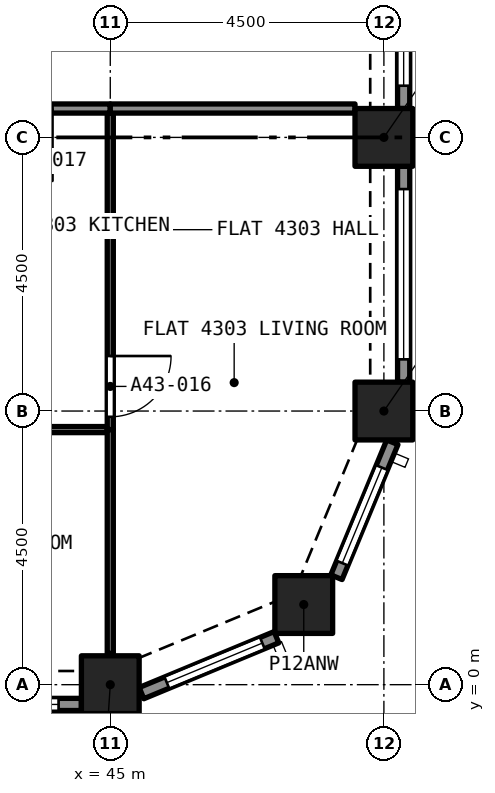
"""IFC4 building model, lengths in metres.
Left out: names, types, materials, properties, quantities, classifications, styles, units other than length and angle.
Written with IfcOpenShell. Run it as: python <this file> out.ifc"""

import sys

from ifc_helpers import new_model, si_unit, direction, frame, frame_2d, origin, origin_2d, place, context, subcontext, project, spatial, rectangle, extrude, element, fill, save


model = new_model("IFC4")
c1 = context("Model", 3, precision=1e-05, world=origin(), true_north=direction((0.0, 1.0)))
c2 = subcontext(c1, "Body", "Model", "MODEL_VIEW")
j1 = project(units=[si_unit("LENGTHUNIT", "METRE"), si_unit("PLANEANGLEUNIT", "RADIAN")], contexts=[c1])
p1 = place(None, origin())
s1 = spatial("IfcSite", under=j1, at=p1, CompositionType="ELEMENT")
p2 = place(p1, origin())
s2 = spatial("IfcBuilding", under=s1, at=p2, CompositionType="ELEMENT")
p3 = place(p2, frame((0.0, 0.0, 155.0)))
s3 = spatial("IfcBuildingStorey", under=s2, at=p3, CompositionType="ELEMENT", Elevation=155.0)
for number, where, z_axis, x_axis in (
    (1, (45.0, 0.0, 0.0), (0.0, 0.0, 1.0), (1.0, 0.0, 0.0)),
    (2, (48.182, 1.318, 0.0), (0.0, 0.0, 1.0), (1.0, 0.0, 0.0)),
    (3, (49.5, 4.5, 0.0), (0.0, 0.0, 1.0), (1.0, 0.0, 0.0)),
    (4, (49.5, 9.0, 0.0), (0.0, 0.0, 1.0), (1.0, 0.0, 0.0)),
):
    element("IfcColumn", number, at=place(p3, frame(where, z_axis=z_axis, x_axis=x_axis)), inside=s3, PredefinedType="COLUMN", context=c2, shape_type="SweptSolid", body=[
        extrude(rectangle(XDim=0.95, YDim=0.95, at=origin_2d()), origin(), (0.0, 0.0, 1.0), 4.4),
    ])
p4 = place(p3, frame((44.525, -0.325, 0.0), z_axis=(0.0, 0.0, 1.0), x_axis=(-1.0, 0.0, 0.0)))
e5 = element("IfcWall", 5, at=p4, inside=s3, PredefinedType="SOLIDWALL", context=c2, shape_type="SweptSolid", body=[
    extrude(rectangle(XDim=3.55, YDim=0.2, at=frame_2d((1.775, 0.0))), origin(), (0.0, 0.0, 1.0), 4.4),
])
p5 = place(p4, frame((0.375, 0.0, 0.45)))
e6 = element("IfcOpeningElement", 6, at=p5, cuts=e5, PredefinedType="OPENING", context=c2, shape_type="SweptSolid", body=[
    extrude(rectangle(XDim=2.8, YDim=2.55, at=frame_2d((1.4, 1.275))), frame((0.0, 0.11, 0.0), z_axis=(0.0, -1.0, 0.0), x_axis=(1.0, 0.0, 0.0)), (0.0, 0.0, 1.0), 0.22),
])
p6 = place(p3, frame((47.733, 0.78, 0.0), z_axis=(0.0, 0.0, 1.0), x_axis=(-0.923880599843, -0.382680855588, 0.0)))
e7 = element("IfcWall", 7, at=p6, inside=s3, PredefinedType="SOLIDWALL", context=c2, shape_type="SweptSolid", body=[
    extrude(rectangle(XDim=2.403, YDim=0.2, at=frame_2d((1.201, 0.0))), origin(), (0.0, 0.0, 1.0), 4.4),
])
p7 = place(p6, frame((0.251, 0.0, 0.45)))
e8 = element("IfcOpeningElement", 8, at=p7, cuts=e7, PredefinedType="OPENING", context=c2, shape_type="SweptSolid", body=[
    extrude(rectangle(XDim=1.7, YDim=2.55, at=frame_2d((0.85, 1.275))), frame((0.0, 0.11, 0.0), z_axis=(0.0, -1.0, 0.0), x_axis=(1.0, 0.0, 0.0)), (0.0, 0.0, 1.0), 0.22),
])
p8 = place(p3, frame((49.639, 3.987, 0.0), z_axis=(0.0, 0.0, 1.0), x_axis=(-0.382680855588, -0.923880599843, 0.0)))
e9 = element("IfcWall", 9, at=p8, inside=s3, PredefinedType="SOLIDWALL", context=c2, shape_type="SweptSolid", body=[
    extrude(rectangle(XDim=2.403, YDim=0.2, at=frame_2d((1.201, 0.0))), origin(), (0.0, 0.0, 1.0), 4.4),
])
p9 = place(p8, frame((0.451, 0.0, 0.45)))
e10 = element("IfcOpeningElement", 10, at=p9, cuts=e9, PredefinedType="OPENING", context=c2, shape_type="SweptSolid", body=[
    extrude(rectangle(XDim=1.7, YDim=2.55, at=frame_2d((0.85, 1.275))), frame((0.0, 0.11, 0.0), z_axis=(0.0, -1.0, 0.0), x_axis=(1.0, 0.0, 0.0)), (0.0, 0.0, 1.0), 0.22),
])
p10 = place(p3, frame((49.825, 8.525, 0.0), z_axis=(0.0, 0.0, 1.0), x_axis=(0.0, -1.0, 0.0)))
e11 = element("IfcWall", 11, at=p10, inside=s3, PredefinedType="SOLIDWALL", context=c2, shape_type="SweptSolid", body=[
    extrude(rectangle(XDim=3.55, YDim=0.2, at=frame_2d((1.775, 0.0))), origin(), (0.0, 0.0, 1.0), 4.4),
])
p11 = place(p10, frame((0.375, 0.0, 0.45)))
e12 = element("IfcOpeningElement", 12, at=p11, cuts=e11, PredefinedType="OPENING", context=c2, shape_type="SweptSolid", body=[
    extrude(rectangle(XDim=2.8, YDim=2.55, at=frame_2d((1.4, 1.275))), frame((0.0, 0.11, 0.0), z_axis=(0.0, -1.0, 0.0), x_axis=(1.0, 0.0, 0.0)), (0.0, 0.0, 1.0), 0.22),
])
p12 = place(p3, frame((49.825, 13.025, 0.0), z_axis=(0.0, 0.0, 1.0), x_axis=(0.0, -1.0, 0.0)))
e13 = element("IfcWall", 13, at=p12, inside=s3, PredefinedType="SOLIDWALL", context=c2, shape_type="SweptSolid", body=[
    extrude(rectangle(XDim=3.55, YDim=0.2, at=frame_2d((1.775, 0.0))), origin(), (0.0, 0.0, 1.0), 4.4),
])
p13 = place(p12, frame((0.375, 0.0, 0.45)))
e14 = element("IfcOpeningElement", 14, at=p13, cuts=e13, PredefinedType="OPENING", context=c2, shape_type="SweptSolid", body=[
    extrude(rectangle(XDim=2.8, YDim=2.55, at=frame_2d((1.4, 1.275))), frame((0.0, 0.11, 0.0), z_axis=(0.0, -1.0, 0.0), x_axis=(1.0, 0.0, 0.0)), (0.0, 0.0, 1.0), 0.22),
])
p14 = place(p3, frame((44.95, 4.195, 0.0), z_axis=(0.0, 0.0, 1.0), x_axis=(-1.0, 0.0, 0.0)))
e15 = element("IfcWall", 15, at=p14, inside=s3, PredefinedType="PARTITIONING", context=c2, shape_type="SweptSolid", body=[
    extrude(rectangle(XDim=4.35, YDim=0.1, at=frame_2d((2.175, 0.0))), origin(), (0.0, 0.0, 1.0), 4.1),
])
p15 = place(p14, frame((1.75, 0.0, 0.0)))
e16 = element("IfcOpeningElement", 16, at=p15, cuts=e15, PredefinedType="OPENING", context=c2, shape_type="SweptSolid", body=[
    extrude(rectangle(XDim=0.9, YDim=2.1, at=frame_2d((0.45, 1.05))), frame((0.0, 0.06, 0.0), z_axis=(0.0, -1.0, 0.0), x_axis=(1.0, 0.0, 0.0)), (0.0, 0.0, 1.0), 0.12),
])
p16 = place(p3, frame((45.0, 0.514, 0.0), z_axis=(0.0, 0.0, 1.0), x_axis=(0.0, 1.0, 0.0)))
e17 = element("IfcWall", 17, at=p16, inside=s3, PredefinedType="PARTITIONING", context=c2, shape_type="SweptSolid", body=[
    extrude(rectangle(XDim=3.681, YDim=0.1, at=frame_2d((1.84, 0.0))), origin(), (0.0, 0.0, 1.0), 4.1),
])
p17 = place(p3, frame((45.0, 9.4, 0.0), z_axis=(0.0, 0.0, 1.0), x_axis=(0.0, -1.0, 0.0)))
e18 = element("IfcWall", 18, at=p17, inside=s3, PredefinedType="PARTITIONING", context=c2, shape_type="SweptSolid", body=[
    extrude(rectangle(XDim=5.205, YDim=0.1, at=frame_2d((2.603, 0.0))), origin(), (0.0, 0.0, 1.0), 4.1),
])
p18 = place(p17, frame((3.995, 0.0, 0.0)))
e19 = element("IfcOpeningElement", 19, at=p18, cuts=e18, PredefinedType="OPENING", context=c2, shape_type="SweptSolid", body=[
    extrude(rectangle(XDim=1.0, YDim=2.1, at=frame_2d((0.5, 1.05))), frame((0.0, 0.06, 0.0), z_axis=(0.0, -1.0, 0.0), x_axis=(1.0, 0.0, 0.0)), (0.0, 0.0, 1.0), 0.12),
])
p19 = place(p3, frame((45.0, 9.475, 0.0), z_axis=(0.0, 0.0, 1.0), x_axis=(-1.0, 0.0, 0.0)))
e20 = element("IfcWall", 20, at=p19, inside=s3, PredefinedType="PARTITIONING", context=c2, shape_type="SweptSolid", body=[
    extrude(rectangle(XDim=2.35, YDim=0.15, at=frame_2d((1.175, 0.0))), origin(), (0.0, 0.0, 1.0), 4.1),
])
p20 = place(p19, frame((0.95, 0.0, 0.0)))
e21 = element("IfcOpeningElement", 21, at=p20, cuts=e20, PredefinedType="OPENING", context=c2, shape_type="SweptSolid", body=[
    extrude(rectangle(XDim=1.2, YDim=2.4, at=frame_2d((0.6, 1.2))), frame((0.0, 0.085, 0.0), z_axis=(0.0, -1.0, 0.0), x_axis=(1.0, 0.0, 0.0)), (0.0, 0.0, 1.0), 0.17),
])
p21 = place(p3, frame((45.0, 9.475, 0.0), z_axis=(0.0, 0.0, 1.0), x_axis=(1.0, 0.0, 0.0)))
e22 = element("IfcWall", 22, at=p21, inside=s3, PredefinedType="PARTITIONING", context=c2, shape_type="SweptSolid", body=[
    extrude(rectangle(XDim=4.025, YDim=0.15, at=frame_2d((2.012, 0.0))), origin(), (0.0, 0.0, 1.0), 4.1),
])
p22 = place(p5, origin())
e23 = element("IfcWindow", 23, at=p22, inside=s3, PartitioningType="SINGLE_PANEL", PredefinedType="WINDOW", context=c2, shape_type="SweptSolid", body=[
    extrude(rectangle(XDim=2.8, YDim=2.55, at=frame_2d((1.4, 1.275))), frame((0.0, 0.03, 0.0), z_axis=(0.0, -1.0, 0.0), x_axis=(1.0, 0.0, 0.0)), (0.0, 0.0, 1.0), 0.06),
])
fill(e6, e23)
p23 = place(p7, origin())
e24 = element("IfcWindow", 24, at=p23, inside=s3, PartitioningType="SINGLE_PANEL", PredefinedType="WINDOW", context=c2, shape_type="SweptSolid", body=[
    extrude(rectangle(XDim=1.7, YDim=2.55, at=frame_2d((0.85, 1.275))), frame((0.0, 0.03, 0.0), z_axis=(0.0, -1.0, 0.0), x_axis=(1.0, 0.0, 0.0)), (0.0, 0.0, 1.0), 0.06),
])
fill(e8, e24)
p24 = place(p9, origin())
e25 = element("IfcWindow", 25, at=p24, inside=s3, PartitioningType="SINGLE_PANEL", PredefinedType="WINDOW", context=c2, shape_type="SweptSolid", body=[
    extrude(rectangle(XDim=1.7, YDim=2.55, at=frame_2d((0.85, 1.275))), frame((0.0, 0.03, 0.0), z_axis=(0.0, -1.0, 0.0), x_axis=(1.0, 0.0, 0.0)), (0.0, 0.0, 1.0), 0.06),
])
fill(e10, e25)
p25 = place(p11, origin())
e26 = element("IfcWindow", 26, at=p25, inside=s3, PartitioningType="SINGLE_PANEL", PredefinedType="WINDOW", context=c2, shape_type="SweptSolid", body=[
    extrude(rectangle(XDim=2.8, YDim=2.55, at=frame_2d((1.4, 1.275))), frame((0.0, 0.03, 0.0), z_axis=(0.0, -1.0, 0.0), x_axis=(1.0, 0.0, 0.0)), (0.0, 0.0, 1.0), 0.06),
])
fill(e12, e26)
p26 = place(p13, origin())
e27 = element("IfcWindow", 27, at=p26, inside=s3, PartitioningType="SINGLE_PANEL", PredefinedType="WINDOW", context=c2, shape_type="SweptSolid", body=[
    extrude(rectangle(XDim=2.8, YDim=2.55, at=frame_2d((1.4, 1.275))), frame((0.0, 0.03, 0.0), z_axis=(0.0, -1.0, 0.0), x_axis=(1.0, 0.0, 0.0)), (0.0, 0.0, 1.0), 0.06),
])
fill(e14, e27)
p27 = place(p18, origin())
e28 = element("IfcDoor", 28, at=p27, inside=s3, OperationType="SINGLE_SWING_RIGHT", PredefinedType="DOOR", context=c2, shape_type="SweptSolid", body=[
    extrude(rectangle(XDim=1.0, YDim=2.1, at=frame_2d((0.5, 1.05))), frame((0.0, 0.025, 0.0), z_axis=(0.0, -1.0, 0.0), x_axis=(1.0, 0.0, 0.0)), (0.0, 0.0, 1.0), 0.05),
])
fill(e19, e28)
save(model, sys.argv[1])
